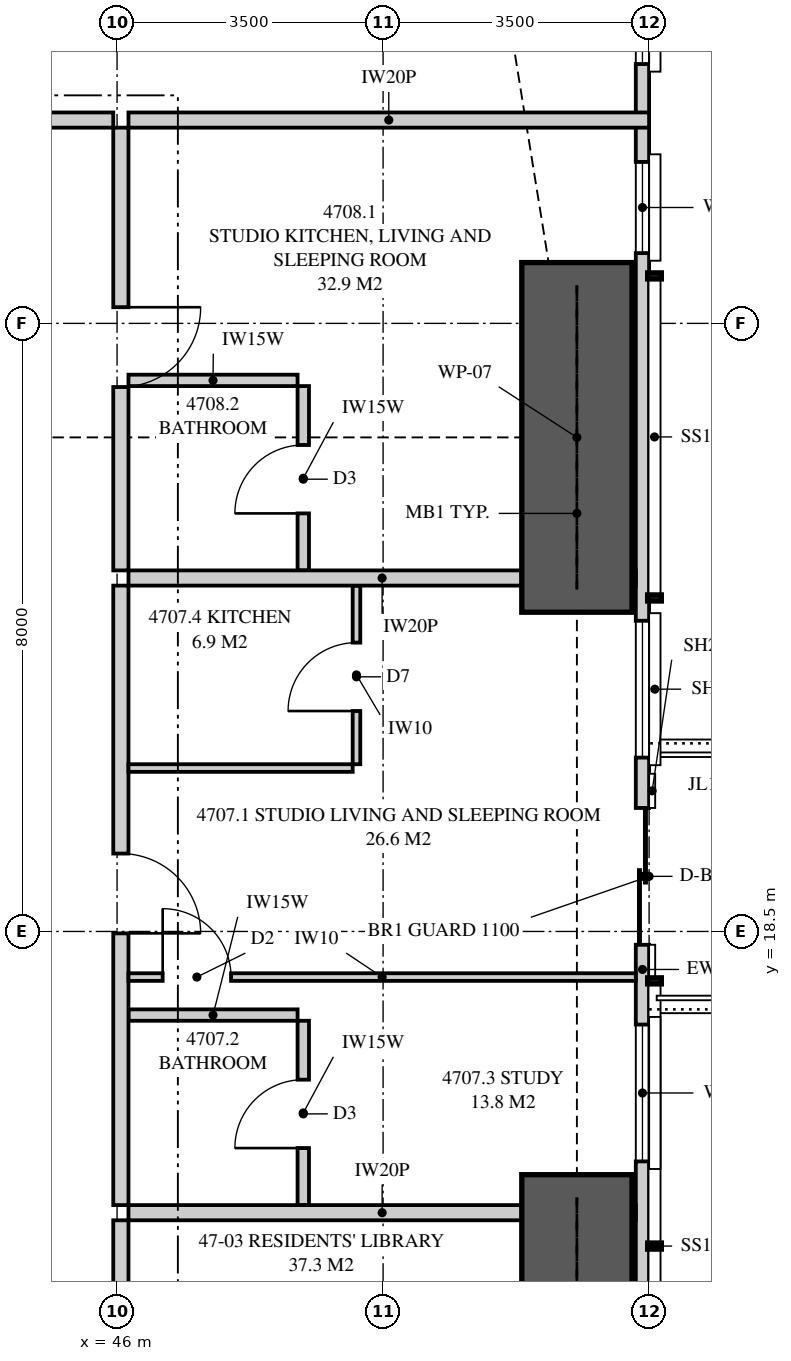
"""IFC4 building model, lengths in metres.
Left out: names, types, materials, properties, quantities, classifications, styles, units other than length and angle.
Written with IfcOpenShell. Run it as: python <this file> out.ifc"""

import sys

from ifc_helpers import new_model, si_unit, direction, frame, frame_2d, origin, place, context, subcontext, project, spatial, polyline, rectangle, outline, extrude, element, fill, save


model = new_model("IFC4")
c1 = context("Model", 3, precision=1e-05, world=origin(), true_north=direction((0.0, 1.0)))
c2 = subcontext(c1, "Body", "Model", "MODEL_VIEW")
j1 = project(units=[si_unit("LENGTHUNIT", "METRE"), si_unit("PLANEANGLEUNIT", "RADIAN")], contexts=[c1])
p1 = place(None, origin())
s1 = spatial("IfcSite", under=j1, at=p1, CompositionType="ELEMENT")
p2 = place(p1, origin())
s2 = spatial("IfcBuilding", under=s1, at=p2, CompositionType="ELEMENT")
p3 = place(p2, frame((0.0, 0.0, 174.45)))
s3 = spatial("IfcBuildingStorey", under=s2, at=p3, CompositionType="ELEMENT", Elevation=174.45)
p4 = place(p3, frame((52.913, 3.051, 0.0), z_axis=(0.0, 0.0, 1.0), x_axis=(0.0, 1.0, 0.0)))
e1 = element("IfcWall", 1, at=p4, inside=s3, PredefinedType="SOLIDWALL", context=c2, shape_type="SweptSolid", body=[
    extrude(outline(polyline([(0.0, 0.0), (29.897, 0.0), (29.897, 3.11), (22.167, 3.11), (22.167, 2.15), (22.074, 2.15), (22.074, 3.11), (21.949, 3.11), (21.949, 2.15), (9.949, 2.15), (9.949, 3.11), (9.847, 3.11), (9.847, 2.15), (9.706, 2.15), (9.706, 3.11), (0.0, 3.11), (0.0, 0.0)])), frame((0.0, 0.087, 0.0), z_axis=(0.0, -1.0, 0.0), x_axis=(1.0, 0.0, 0.0)), (0.0, 0.0, 1.0), 0.175),
])
p5 = place(p4, frame((1.797, 0.0, 0.4)))
e2 = element("IfcOpeningElement", 2, at=p5, cuts=e1, PredefinedType="OPENING", context=c2, shape_type="SweptSolid", body=[
    extrude(rectangle(XDim=1.8, YDim=1.7, at=frame_2d((0.9, 0.85))), frame((0.0, 0.097, 0.0), z_axis=(0.0, -1.0, 0.0), x_axis=(1.0, 0.0, 0.0)), (0.0, 0.0, 1.0), 0.195),
])
p6 = place(p4, frame((6.321, 0.0, 0.4)))
e3 = element("IfcOpeningElement", 3, at=p6, cuts=e1, PredefinedType="OPENING", context=c2, shape_type="SweptSolid", body=[
    extrude(rectangle(XDim=1.2, YDim=1.7, at=frame_2d((0.6, 0.85))), frame((0.0, 0.097, 0.0), z_axis=(0.0, -1.0, 0.0), x_axis=(1.0, 0.0, 0.0)), (0.0, 0.0, 1.0), 0.195),
])
p7 = place(p4, frame((12.424, 0.0, 0.4)))
e4 = element("IfcOpeningElement", 4, at=p7, cuts=e1, PredefinedType="OPENING", context=c2, shape_type="SweptSolid", body=[
    extrude(rectangle(XDim=1.8, YDim=1.7, at=frame_2d((0.9, 0.85))), frame((0.0, 0.097, 0.0), z_axis=(0.0, -1.0, 0.0), x_axis=(1.0, 0.0, 0.0)), (0.0, 0.0, 1.0), 0.195),
])
p8 = place(p4, frame((15.274, 0.0, 0.0)))
e5 = element("IfcOpeningElement", 5, at=p8, cuts=e1, PredefinedType="OPENING", context=c2, shape_type="SweptSolid", body=[
    extrude(rectangle(XDim=1.8, YDim=2.1, at=frame_2d((0.9, 1.05))), frame((0.0, 0.097, 0.0), z_axis=(0.0, -1.0, 0.0), x_axis=(1.0, 0.0, 0.0)), (0.0, 0.0, 1.0), 0.195),
])
p9 = place(p4, frame((17.736, 0.0, 0.4)))
e6 = element("IfcOpeningElement", 6, at=p9, cuts=e1, PredefinedType="OPENING", context=c2, shape_type="SweptSolid", body=[
    extrude(rectangle(XDim=1.8, YDim=1.7, at=frame_2d((0.9, 0.85))), frame((0.0, 0.097, 0.0), z_axis=(0.0, -1.0, 0.0), x_axis=(1.0, 0.0, 0.0)), (0.0, 0.0, 1.0), 0.195),
])
p10 = place(p4, frame((24.373, 0.0, 0.4)))
e7 = element("IfcOpeningElement", 7, at=p10, cuts=e1, PredefinedType="OPENING", context=c2, shape_type="SweptSolid", body=[
    extrude(rectangle(XDim=1.2, YDim=1.7, at=frame_2d((0.6, 0.85))), frame((0.0, 0.097, 0.0), z_axis=(0.0, -1.0, 0.0), x_axis=(1.0, 0.0, 0.0)), (0.0, 0.0, 1.0), 0.195),
])
p11 = place(p4, frame((26.861, 0.0, 0.4)))
e8 = element("IfcOpeningElement", 8, at=p11, cuts=e1, PredefinedType="OPENING", context=c2, shape_type="SweptSolid", body=[
    extrude(rectangle(XDim=2.4, YDim=1.7, at=frame_2d((1.2, 0.85))), frame((0.0, 0.097, 0.0), z_axis=(0.0, -1.0, 0.0), x_axis=(1.0, 0.0, 0.0)), (0.0, 0.0, 1.0), 0.195),
])
p12 = place(p3, frame((24.05, 29.175, 0.0), z_axis=(0.0, 0.0, 1.0), x_axis=(1.0, 0.0, 0.0)))
e9 = element("IfcWall", 9, at=p12, inside=s3, PredefinedType="PARTITIONING", context=c2, shape_type="SweptSolid", body=[
    extrude(outline(polyline([(0.0, 0.0), (21.9, 0.0), (21.9, 3.11), (19.037, 3.11), (19.037, 2.541), (18.363, 2.541), (18.363, 3.11), (8.787, 3.11), (8.787, 2.541), (8.113, 2.541), (8.113, 3.11), (0.0, 3.11), (0.0, 0.0)])), frame((0.0, 0.1, 0.0), z_axis=(0.0, -1.0, 0.0), x_axis=(1.0, 0.0, 0.0)), (0.0, 0.0, 1.0), 0.2),
])
p13 = place(p12, frame((13.925, 0.0, 0.0)))
e10 = element("IfcOpeningElement", 10, at=p13, cuts=e9, PredefinedType="OPENING", context=c2, shape_type="SweptSolid", body=[
    extrude(rectangle(XDim=1.05, YDim=2.2, at=frame_2d((0.525, 1.1))), frame((0.0, 0.11, 0.0), z_axis=(0.0, -1.0, 0.0), x_axis=(1.0, 0.0, 0.0)), (0.0, 0.0, 1.0), 0.22),
])
p14 = place(p3, frame((46.15, 29.175, 0.0), z_axis=(0.0, 0.0, 1.0), x_axis=(1.0, 0.0, 0.0)))
e11 = element("IfcWall", 11, at=p14, inside=s3, PredefinedType="PARTITIONING", context=c2, shape_type="SweptSolid", body=[
    extrude(outline(polyline([(0.0, 0.0), (6.85, 0.0), (6.85, 3.11), (6.147, 3.11), (6.147, 2.15), (4.303, 2.15), (4.303, 3.11), (0.0, 3.11), (0.0, 0.0)])), frame((0.0, 0.1, 0.0), z_axis=(0.0, -1.0, 0.0), x_axis=(1.0, 0.0, 0.0)), (0.0, 0.0, 1.0), 0.2),
])
p15 = place(p3, frame((52.825, 14.8, 0.0), z_axis=(0.0, 0.0, 1.0), x_axis=(-1.0, 0.0, 0.0)))
e12 = element("IfcWall", 12, at=p15, inside=s3, PredefinedType="PARTITIONING", context=c2, shape_type="SweptSolid", body=[
    extrude(outline(polyline([(0.529, 2.15), (0.0, 2.15), (0.0, 0.0), (0.529, 0.0), (0.529, 0.039), (1.021, 0.039), (1.021, 0.0), (6.675, 0.0), (6.675, 3.11), (1.685, 3.11), (1.685, 2.15), (1.021, 2.15), (1.021, 2.111), (0.529, 2.111), (0.529, 2.15)])), frame((0.0, 0.1, 0.0), z_axis=(0.0, -1.0, 0.0), x_axis=(1.0, 0.0, 0.0)), (0.0, 0.0, 1.0), 0.2),
])
p16 = place(p3, frame((52.825, 23.15, 0.0), z_axis=(0.0, 0.0, 1.0), x_axis=(-1.0, 0.0, 0.0)))
e13 = element("IfcWall", 13, at=p16, inside=s3, PredefinedType="PARTITIONING", context=c2, shape_type="SweptSolid", body=[
    extrude(outline(polyline([(0.0, 0.0), (6.675, 0.0), (6.675, 3.11), (1.685, 3.11), (1.685, 2.15), (0.0, 2.15), (0.0, 3.11), (0.0, 0.0)])), frame((0.0, 0.1, 0.0), z_axis=(0.0, -1.0, 0.0), x_axis=(1.0, 0.0, 0.0)), (0.0, 0.0, 1.0), 0.2),
])
p17 = place(p3, frame((46.05, 14.9, 0.0), z_axis=(0.0, 0.0, 1.0), x_axis=(0.0, 1.0, 0.0)))
e14 = element("IfcWall", 14, at=p17, inside=s3, PredefinedType="PARTITIONING", context=c2, shape_type="SweptSolid", body=[
    extrude(rectangle(XDim=8.15, YDim=0.2, at=frame_2d((4.075, 0.0))), origin(), (0.0, 0.0, 1.0), 3.11),
])
p18 = place(p17, frame((3.575, 0.0, 0.0)))
e15 = element("IfcOpeningElement", 15, at=p18, cuts=e14, PredefinedType="OPENING", context=c2, shape_type="SweptSolid", body=[
    extrude(rectangle(XDim=1.05, YDim=2.2, at=frame_2d((0.525, 1.1))), frame((0.0, 0.11, 0.0), z_axis=(0.0, -1.0, 0.0), x_axis=(1.0, 0.0, 0.0)), (0.0, 0.0, 1.0), 0.22),
])
p19 = place(p3, frame((48.45, 14.9, 0.0), z_axis=(0.0, 0.0, 1.0), x_axis=(0.0, 1.0, 0.0)))
e16 = element("IfcWall", 16, at=p19, inside=s3, PredefinedType="PLUMBINGWALL", context=c2, shape_type="SweptSolid", body=[
    extrude(rectangle(XDim=2.425, YDim=0.15, at=frame_2d((1.212, 0.0))), origin(), (0.0, 0.0, 1.0), 3.11),
])
p20 = place(p19, frame((0.75, 0.0, 0.0)))
e17 = element("IfcOpeningElement", 17, at=p20, cuts=e16, PredefinedType="OPENING", context=c2, shape_type="SweptSolid", body=[
    extrude(rectangle(XDim=0.9, YDim=2.1, at=frame_2d((0.45, 1.05))), frame((0.0, 0.085, 0.0), z_axis=(0.0, -1.0, 0.0), x_axis=(1.0, 0.0, 0.0)), (0.0, 0.0, 1.0), 0.17),
])
p21 = place(p3, frame((48.375, 17.4, 0.0), z_axis=(0.0, 0.0, 1.0), x_axis=(-1.0, 0.0, 0.0)))
e18 = element("IfcWall", 18, at=p21, inside=s3, PredefinedType="PLUMBINGWALL", context=c2, shape_type="SweptSolid", body=[
    extrude(rectangle(XDim=2.225, YDim=0.15, at=frame_2d((1.113, 0.0))), origin(), (0.0, 0.0, 1.0), 3.11),
])
p22 = place(p3, frame((52.825, 17.9, 0.0), z_axis=(0.0, 0.0, 1.0), x_axis=(-1.0, 0.0, 0.0)))
e19 = element("IfcWall", 19, at=p22, inside=s3, PredefinedType="PARTITIONING", context=c2, shape_type="SweptSolid", body=[
    extrude(outline(polyline([(0.0, 0.0), (6.675, 0.0), (6.675, 3.11), (1.635, 3.11), (1.635, 2.15), (0.0, 2.15), (0.0, 3.11), (0.0, 0.0)])), frame((0.0, 0.05, 0.0), z_axis=(0.0, -1.0, 0.0), x_axis=(1.0, 0.0, 0.0)), (0.0, 0.0, 1.0), 0.1),
])
p23 = place(p22, frame((5.325, 0.0, 0.0)))
e20 = element("IfcOpeningElement", 20, at=p23, cuts=e19, PredefinedType="OPENING", context=c2, shape_type="SweptSolid", body=[
    extrude(rectangle(XDim=0.9, YDim=2.1, at=frame_2d((0.45, 1.05))), frame((0.0, 0.06, 0.0), z_axis=(0.0, -1.0, 0.0), x_axis=(1.0, 0.0, 0.0)), (0.0, 0.0, 1.0), 0.12),
])
p24 = place(p3, frame((49.15, 20.7, 0.0), z_axis=(0.0, 0.0, 1.0), x_axis=(0.0, 1.0, 0.0)))
e21 = element("IfcWall", 21, at=p24, inside=s3, PredefinedType="PARTITIONING", context=c2, shape_type="SweptSolid", body=[
    extrude(rectangle(XDim=2.35, YDim=0.1, at=frame_2d((1.175, 0.0))), origin(), (0.0, 0.0, 1.0), 3.11),
])
p25 = place(p24, frame((0.7, 0.0, 0.0)))
e22 = element("IfcOpeningElement", 22, at=p25, cuts=e21, PredefinedType="OPENING", context=c2, shape_type="SweptSolid", body=[
    extrude(rectangle(XDim=0.9, YDim=2.1, at=frame_2d((0.45, 1.05))), frame((0.0, 0.06, 0.0), z_axis=(0.0, -1.0, 0.0), x_axis=(1.0, 0.0, 0.0)), (0.0, 0.0, 1.0), 0.12),
])
p26 = place(p3, frame((49.1, 20.65, 0.0), z_axis=(0.0, 0.0, 1.0), x_axis=(-1.0, 0.0, 0.0)))
e23 = element("IfcWall", 23, at=p26, inside=s3, PredefinedType="PARTITIONING", context=c2, shape_type="SweptSolid", body=[
    extrude(rectangle(XDim=2.95, YDim=0.1, at=frame_2d((1.475, 0.0))), origin(), (0.0, 0.0, 1.0), 3.11),
])
p27 = place(p3, frame((46.05, 23.25, 0.0), z_axis=(0.0, 0.0, 1.0), x_axis=(0.0, 1.0, 0.0)))
e24 = element("IfcWall", 24, at=p27, inside=s3, PredefinedType="PARTITIONING", context=c2, shape_type="SweptSolid", body=[
    extrude(outline(polyline([(0.0, 0.0), (5.825, 0.0), (5.825, 3.11), (2.087, 3.11), (2.087, 2.541), (1.413, 2.541), (1.413, 3.11), (0.0, 3.11), (0.0, 0.0)])), frame((0.0, 0.1, 0.0), z_axis=(0.0, -1.0, 0.0), x_axis=(1.0, 0.0, 0.0)), (0.0, 0.0, 1.0), 0.2),
])
p28 = place(p27, frame((2.413, 0.0, 0.0)))
e25 = element("IfcOpeningElement", 25, at=p28, cuts=e24, PredefinedType="OPENING", context=c2, shape_type="SweptSolid", body=[
    extrude(rectangle(XDim=1.05, YDim=2.2, at=frame_2d((0.525, 1.1))), frame((0.0, 0.11, 0.0), z_axis=(0.0, -1.0, 0.0), x_axis=(1.0, 0.0, 0.0)), (0.0, 0.0, 1.0), 0.22),
])
p29 = place(p3, frame((48.45, 23.25, 0.0), z_axis=(0.0, 0.0, 1.0), x_axis=(0.0, 1.0, 0.0)))
e26 = element("IfcWall", 26, at=p29, inside=s3, PredefinedType="PLUMBINGWALL", context=c2, shape_type="SweptSolid", body=[
    extrude(outline(polyline([(0.0, 0.0), (2.425, 0.0), (2.425, 3.11), (2.062, 3.11), (2.062, 2.541), (1.438, 2.541), (1.438, 3.11), (0.0, 3.11), (0.0, 0.0)])), frame((0.0, 0.075, 0.0), z_axis=(0.0, -1.0, 0.0), x_axis=(1.0, 0.0, 0.0)), (0.0, 0.0, 1.0), 0.15),
])
p30 = place(p29, frame((0.75, 0.0, 0.0)))
e27 = element("IfcOpeningElement", 27, at=p30, cuts=e26, PredefinedType="OPENING", context=c2, shape_type="SweptSolid", body=[
    extrude(rectangle(XDim=0.9, YDim=2.1, at=frame_2d((0.45, 1.05))), frame((0.0, 0.085, 0.0), z_axis=(0.0, -1.0, 0.0), x_axis=(1.0, 0.0, 0.0)), (0.0, 0.0, 1.0), 0.17),
])
p31 = place(p3, frame((48.375, 25.75, 0.0), z_axis=(0.0, 0.0, 1.0), x_axis=(-1.0, 0.0, 0.0)))
e28 = element("IfcWall", 28, at=p31, inside=s3, PredefinedType="PLUMBINGWALL", context=c2, shape_type="SweptSolid", body=[
    extrude(rectangle(XDim=2.225, YDim=0.15, at=frame_2d((1.113, 0.0))), origin(), (0.0, 0.0, 1.0), 3.11),
])
p32 = place(p3, frame((46.05, 13.512, 0.0), z_axis=(0.0, 0.0, 1.0), x_axis=(0.0, 1.0, 0.0)))
e29 = element("IfcWall", 29, at=p32, inside=s3, PredefinedType="PARTITIONING", context=c2, shape_type="SweptSolid", body=[
    extrude(rectangle(XDim=1.188, YDim=0.2, at=frame_2d((0.594, 0.0))), origin(), (0.0, 0.0, 1.0), 3.11),
])
for number, where, z_axis, x_axis in (
    (30, (52.05, 10.7, 0.0), (0.0, 0.0, 1.0), (0.0, 1.0, 0.0)),
    (31, (52.05, 22.7, 0.0), (0.0, 0.0, 1.0), (0.0, 1.0, 0.0)),
):
    element("IfcWall", number, at=place(p3, frame(where, z_axis=z_axis, x_axis=x_axis)), inside=s3, PredefinedType="SHEAR", context=c2, shape_type="SweptSolid", body=[
        extrude(rectangle(XDim=4.6, YDim=1.45, at=frame_2d((2.3, 0.0))), origin(), (0.0, 0.0, 1.0), 3.35),
    ])
p33 = place(p7, origin())
e32 = element("IfcWindow", 32, at=p33, inside=s3, PartitioningType="SINGLE_PANEL", PredefinedType="WINDOW", context=c2, shape_type="SweptSolid", body=[
    extrude(rectangle(XDim=1.8, YDim=1.7, at=frame_2d((0.9, 0.85))), frame((0.0, 0.03, 0.0), z_axis=(0.0, -1.0, 0.0), x_axis=(1.0, 0.0, 0.0)), (0.0, 0.0, 1.0), 0.06),
])
fill(e4, e32)
p34 = place(p8, origin())
e33 = element("IfcDoor", 33, at=p34, inside=s3, OperationType="SLIDING_TO_LEFT", PredefinedType="DOOR", context=c2, shape_type="SweptSolid", body=[
    extrude(rectangle(XDim=1.8, YDim=2.1, at=frame_2d((0.9, 1.05))), frame((0.0, 0.025, 0.0), z_axis=(0.0, -1.0, 0.0), x_axis=(1.0, 0.0, 0.0)), (0.0, 0.0, 1.0), 0.05),
])
fill(e5, e33)
p35 = place(p9, origin())
e34 = element("IfcWindow", 34, at=p35, inside=s3, PartitioningType="SINGLE_PANEL", PredefinedType="WINDOW", context=c2, shape_type="SweptSolid", body=[
    extrude(rectangle(XDim=1.8, YDim=1.7, at=frame_2d((0.9, 0.85))), frame((0.0, 0.03, 0.0), z_axis=(0.0, -1.0, 0.0), x_axis=(1.0, 0.0, 0.0)), (0.0, 0.0, 1.0), 0.06),
])
fill(e6, e34)
p36 = place(p10, origin())
e35 = element("IfcWindow", 35, at=p36, inside=s3, PartitioningType="SINGLE_PANEL", PredefinedType="WINDOW", context=c2, shape_type="SweptSolid", body=[
    extrude(rectangle(XDim=1.2, YDim=1.7, at=frame_2d((0.6, 0.85))), frame((0.0, 0.03, 0.0), z_axis=(0.0, -1.0, 0.0), x_axis=(1.0, 0.0, 0.0)), (0.0, 0.0, 1.0), 0.06),
])
fill(e7, e35)
p37 = place(p11, origin())
e36 = element("IfcWindow", 36, at=p37, inside=s3, PartitioningType="SINGLE_PANEL", PredefinedType="WINDOW", context=c2, shape_type="SweptSolid", body=[
    extrude(rectangle(XDim=2.4, YDim=1.7, at=frame_2d((1.2, 0.85))), frame((0.0, 0.03, 0.0), z_axis=(0.0, -1.0, 0.0), x_axis=(1.0, 0.0, 0.0)), (0.0, 0.0, 1.0), 0.06),
])
fill(e8, e36)
p38 = place(p18, frame((1.05, 0.0, 0.0), z_axis=(0.0, 0.0, 1.0), x_axis=(-1.0, 0.0, 0.0)))
e37 = element("IfcDoor", 37, at=p38, inside=s3, OperationType="SINGLE_SWING_RIGHT", PredefinedType="DOOR", context=c2, shape_type="SweptSolid", body=[
    extrude(rectangle(XDim=1.05, YDim=2.2, at=frame_2d((0.525, 1.1))), frame((0.0, 0.025, 0.0), z_axis=(0.0, -1.0, 0.0), x_axis=(1.0, 0.0, 0.0)), (0.0, 0.0, 1.0), 0.05),
])
fill(e15, e37)
p39 = place(p20, origin())
e38 = element("IfcDoor", 38, at=p39, inside=s3, OperationType="SINGLE_SWING_LEFT", PredefinedType="DOOR", context=c2, shape_type="SweptSolid", body=[
    extrude(rectangle(XDim=0.9, YDim=2.1, at=frame_2d((0.45, 1.05))), frame((0.0, 0.025, 0.0), z_axis=(0.0, -1.0, 0.0), x_axis=(1.0, 0.0, 0.0)), (0.0, 0.0, 1.0), 0.05),
])
fill(e17, e38)
p40 = place(p23, frame((0.9, 0.0, 0.0), z_axis=(0.0, 0.0, 1.0), x_axis=(-1.0, 0.0, 0.0)))
e39 = element("IfcDoor", 39, at=p40, inside=s3, OperationType="SINGLE_SWING_LEFT", PredefinedType="DOOR", context=c2, shape_type="SweptSolid", body=[
    extrude(rectangle(XDim=0.9, YDim=2.1, at=frame_2d((0.45, 1.05))), frame((0.0, 0.025, 0.0), z_axis=(0.0, -1.0, 0.0), x_axis=(1.0, 0.0, 0.0)), (0.0, 0.0, 1.0), 0.05),
])
fill(e20, e39)
p41 = place(p25, origin())
e40 = element("IfcDoor", 40, at=p41, inside=s3, OperationType="SINGLE_SWING_LEFT", PredefinedType="DOOR", context=c2, shape_type="SweptSolid", body=[
    extrude(rectangle(XDim=0.9, YDim=2.1, at=frame_2d((0.45, 1.05))), frame((0.0, 0.025, 0.0), z_axis=(0.0, -1.0, 0.0), x_axis=(1.0, 0.0, 0.0)), (0.0, 0.0, 1.0), 0.05),
])
fill(e22, e40)
p42 = place(p28, frame((1.05, 0.0, 0.0), z_axis=(0.0, 0.0, 1.0), x_axis=(-1.0, 0.0, 0.0)))
e41 = element("IfcDoor", 41, at=p42, inside=s3, OperationType="SINGLE_SWING_LEFT", PredefinedType="DOOR", context=c2, shape_type="SweptSolid", body=[
    extrude(rectangle(XDim=1.05, YDim=2.2, at=frame_2d((0.525, 1.1))), frame((0.0, 0.025, 0.0), z_axis=(0.0, -1.0, 0.0), x_axis=(1.0, 0.0, 0.0)), (0.0, 0.0, 1.0), 0.05),
])
fill(e25, e41)
p43 = place(p30, origin())
e42 = element("IfcDoor", 42, at=p43, inside=s3, OperationType="SINGLE_SWING_LEFT", PredefinedType="DOOR", context=c2, shape_type="SweptSolid", body=[
    extrude(rectangle(XDim=0.9, YDim=2.1, at=frame_2d((0.45, 1.05))), frame((0.0, 0.025, 0.0), z_axis=(0.0, -1.0, 0.0), x_axis=(1.0, 0.0, 0.0)), (0.0, 0.0, 1.0), 0.05),
])
fill(e27, e42)
save(model, sys.argv[1])
